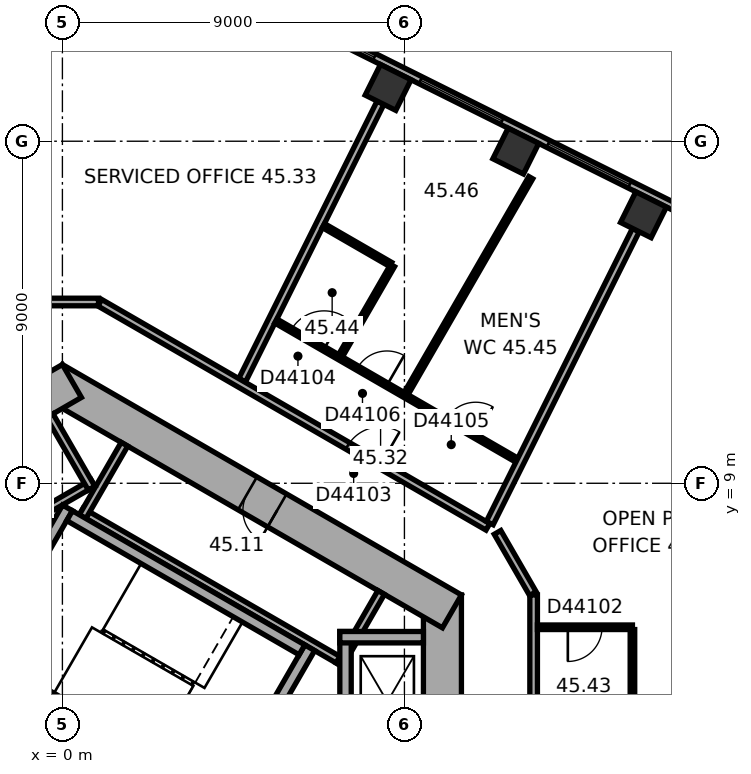
"""IFC4 building model, lengths in metres.
Left out: names, types, materials, properties, quantities, classifications, styles, units other than length and angle.
Written with IfcOpenShell. Run it as: python <this file> out.ifc"""

import sys

from ifc_helpers import new_model, si_unit, direction, frame, frame_2d, origin, origin_2d, place, context, subcontext, project, spatial, rectangle, extrude, element, fill, save


model = new_model("IFC4")
c1 = context("Model", 3, precision=1e-05, world=origin(), true_north=direction((0.0, 1.0)))
c2 = subcontext(c1, "Body", "Model", "MODEL_VIEW")
j1 = project(units=[si_unit("LENGTHUNIT", "METRE"), si_unit("PLANEANGLEUNIT", "RADIAN")], contexts=[c1])
p1 = place(None, origin())
s1 = spatial("IfcSite", under=j1, at=p1, CompositionType="ELEMENT")
p2 = place(p1, origin())
s2 = spatial("IfcBuilding", under=s1, at=p2, CompositionType="ELEMENT")
p3 = place(p2, frame((0.0, 0.0, 183.6)))
s3 = spatial("IfcBuildingStorey", under=s2, at=p3, CompositionType="ELEMENT", Elevation=183.6)
for number, where, z_axis, x_axis in (
    (1, (15.29, 16.065, 0.0), (0.0, 0.0, 1.0), (-0.895, 0.446, 0.0)),
    (2, (11.931, 17.74, 0.0), (0.0, 0.0, 1.0), (-0.895, 0.446, 0.0)),
    (3, (8.571, 19.416, 0.0), (0.0, 0.0, 1.0), (-0.895, 0.446, 0.0)),
):
    element("IfcColumn", number, at=place(p3, frame(where, z_axis=z_axis, x_axis=x_axis)), inside=s3, PredefinedType="COLUMN", context=c2, shape_type="SweptSolid", body=[
        extrude(rectangle(XDim=0.9, YDim=0.9, at=origin_2d()), origin(), (0.0, 0.0, 1.0), 3.7),
    ])
p4 = place(p3, frame((10.0, -6.062, 0.0), z_axis=(0.0, 0.0, 1.0), x_axis=(0.0, 1.0, 0.0)))
e4 = element("IfcWall", 4, at=p4, inside=s3, PredefinedType="SHEAR", context=c2, shape_type="SweptSolid", body=[
    extrude(rectangle(XDim=12.125, YDim=1.0, at=frame_2d((6.062, 0.0))), origin(), (0.0, 0.0, 1.0), 3.7),
])
p5 = place(p4, frame((6.262, 0.0, 0.0)))
e5 = element("IfcOpeningElement", 5, at=p5, cuts=e4, PredefinedType="OPENING", context=c2, shape_type="SweptSolid", body=[
    extrude(rectangle(XDim=1.5, YDim=2.1, at=frame_2d((0.75, 1.05))), frame((0.0, 0.51, 0.0), z_axis=(0.0, -1.0, 0.0), x_axis=(1.0, 0.0, 0.0)), (0.0, 0.0, 1.0), 1.02),
])
p6 = place(p4, frame((3.112, 0.0, 0.0)))
e6 = element("IfcOpeningElement", 6, at=p6, cuts=e4, PredefinedType="OPENING", context=c2, shape_type="SweptSolid", body=[
    extrude(rectangle(XDim=0.9, YDim=2.1, at=frame_2d((0.45, 1.05))), frame((0.0, 0.51, 0.0), z_axis=(0.0, -1.0, 0.0), x_axis=(1.0, 0.0, 0.0)), (0.0, 0.0, 1.0), 1.02),
])
p7 = place(p3, frame((10.25, 5.629, 0.0), z_axis=(0.0, 0.0, 1.0), x_axis=(-0.866022616891, 0.50000482701, 0.0)))
e7 = element("IfcWall", 7, at=p7, inside=s3, PredefinedType="SHEAR", context=c2, shape_type="SweptSolid", body=[
    extrude(rectangle(XDim=12.125, YDim=1.0, at=frame_2d((6.062, 0.0))), origin(), (0.0, 0.0, 1.0), 3.7),
])
p8 = place(p7, frame((5.312, 0.0, 0.0)))
e8 = element("IfcOpeningElement", 8, at=p8, cuts=e7, PredefinedType="OPENING", context=c2, shape_type="SweptSolid", body=[
    extrude(rectangle(XDim=0.9, YDim=2.1, at=frame_2d((0.45, 1.05))), frame((0.0, 0.51, 0.0), z_axis=(0.0, -1.0, 0.0), x_axis=(1.0, 0.0, 0.0)), (0.0, 0.0, 1.0), 1.02),
])
p9 = place(p3, frame((0.25, 11.691, 0.0), z_axis=(0.0, 0.0, 1.0), x_axis=(-0.866022616891, -0.50000482701, 0.0)))
e9 = element("IfcWall", 9, at=p9, inside=s3, PredefinedType="SHEAR", context=c2, shape_type="SweptSolid", body=[
    extrude(rectangle(XDim=12.125, YDim=1.0, at=frame_2d((6.062, 0.0))), origin(), (0.0, 0.0, 1.0), 3.7),
])
p10 = place(p9, frame((6.262, 0.0, 0.0)))
e10 = element("IfcOpeningElement", 10, at=p10, cuts=e9, PredefinedType="OPENING", context=c2, shape_type="SweptSolid", body=[
    extrude(rectangle(XDim=1.5, YDim=2.1, at=frame_2d((0.75, 1.05))), frame((0.0, 0.51, 0.0), z_axis=(0.0, -1.0, 0.0), x_axis=(1.0, 0.0, 0.0)), (0.0, 0.0, 1.0), 1.02),
])
p11 = place(p9, frame((1.812, 0.0, 0.0)))
e11 = element("IfcOpeningElement", 11, at=p11, cuts=e9, PredefinedType="OPENING", context=c2, shape_type="SweptSolid", body=[
    extrude(rectangle(XDim=0.9, YDim=2.1, at=frame_2d((0.45, 1.05))), frame((0.0, 0.51, 0.0), z_axis=(0.0, -1.0, 0.0), x_axis=(1.0, 0.0, 0.0)), (0.0, 0.0, 1.0), 1.02),
])
p12 = place(p9, frame((4.412, 0.0, 0.0)))
e12 = element("IfcOpeningElement", 12, at=p12, cuts=e9, PredefinedType="OPENING", context=c2, shape_type="SweptSolid", body=[
    extrude(rectangle(XDim=0.9, YDim=2.1, at=frame_2d((0.45, 1.05))), frame((0.0, 0.51, 0.0), z_axis=(0.0, -1.0, 0.0), x_axis=(1.0, 0.0, 0.0)), (0.0, 0.0, 1.0), 1.02),
])
p13 = place(p3, frame((19.464, 14.599, 0.0), z_axis=(0.0, 0.0, 1.0), x_axis=(-0.894935755043, 0.446195018289, 0.0)))
e13 = element("IfcWall", 13, at=p13, inside=s3, PredefinedType="STANDARD", context=c2, shape_type="SweptSolid", body=[
    extrude(rectangle(XDim=20.044, YDim=0.2, at=frame_2d((10.022, 0.0))), origin(), (0.0, 0.0, 1.0), 3.7),
])
p14 = place(p13, frame((1.313, 0.0, 0.9)))
e14 = element("IfcOpeningElement", 14, at=p14, cuts=e13, PredefinedType="OPENING", context=c2, shape_type="SweptSolid", body=[
    extrude(rectangle(XDim=2.4, YDim=2.0, at=frame_2d((1.2, 1.0))), frame((0.0, 0.11, 0.0), z_axis=(0.0, -1.0, 0.0), x_axis=(1.0, 0.0, 0.0)), (0.0, 0.0, 1.0), 0.22),
])
p15 = place(p13, frame((5.067, 0.0, 0.9)))
e15 = element("IfcOpeningElement", 15, at=p15, cuts=e13, PredefinedType="OPENING", context=c2, shape_type="SweptSolid", body=[
    extrude(rectangle(XDim=2.4, YDim=2.0, at=frame_2d((1.2, 1.0))), frame((0.0, 0.11, 0.0), z_axis=(0.0, -1.0, 0.0), x_axis=(1.0, 0.0, 0.0)), (0.0, 0.0, 1.0), 0.22),
])
p16 = place(p13, frame((8.821, 0.0, 0.9)))
e16 = element("IfcOpeningElement", 16, at=p16, cuts=e13, PredefinedType="OPENING", context=c2, shape_type="SweptSolid", body=[
    extrude(rectangle(XDim=2.4, YDim=2.0, at=frame_2d((1.2, 1.0))), frame((0.0, 0.11, 0.0), z_axis=(0.0, -1.0, 0.0), x_axis=(1.0, 0.0, 0.0)), (0.0, 0.0, 1.0), 0.22),
])
p17 = place(p13, frame((12.575, 0.0, 0.9)))
e17 = element("IfcOpeningElement", 17, at=p17, cuts=e13, PredefinedType="OPENING", context=c2, shape_type="SweptSolid", body=[
    extrude(rectangle(XDim=2.4, YDim=2.0, at=frame_2d((1.2, 1.0))), frame((0.0, 0.11, 0.0), z_axis=(0.0, -1.0, 0.0), x_axis=(1.0, 0.0, 0.0)), (0.0, 0.0, 1.0), 0.22),
])
p18 = place(p13, frame((16.329, 0.0, 0.9)))
e18 = element("IfcOpeningElement", 18, at=p18, cuts=e13, PredefinedType="OPENING", context=c2, shape_type="SweptSolid", body=[
    extrude(rectangle(XDim=2.4, YDim=2.0, at=frame_2d((1.2, 1.0))), frame((0.0, 0.11, 0.0), z_axis=(0.0, -1.0, 0.0), x_axis=(1.0, 0.0, 0.0)), (0.0, 0.0, 1.0), 0.22),
])
p19 = place(p3, frame((7.424, 4.259, 0.0), z_axis=(0.0, 0.0, 1.0), x_axis=(-0.866026010844, 0.49999894854, 0.0)))
e19 = element("IfcWall", 19, at=p19, inside=s3, PredefinedType="PARTITIONING", context=c2, shape_type="SweptSolid", body=[
    extrude(rectangle(XDim=8.0, YDim=0.2, at=frame_2d((4.0, 0.0))), origin(), (0.0, 0.0, 1.0), 3.42),
])
for number, where, z_axis, x_axis in (
    (20, (7.287, 4.222, 0.0), (0.0, 0.0, 1.0), (0.5, 0.866, 0.0)),
    (21, (0.532, 8.122, 0.0), (0.0, 0.0, 1.0), (0.5, 0.866, 0.0)),
):
    element("IfcWall", number, at=place(p3, frame(where, z_axis=z_axis, x_axis=x_axis)), inside=s3, PredefinedType="PARTITIONING", context=c2, shape_type="SweptSolid", body=[
        extrude(rectangle(XDim=2.2, YDim=0.2, at=frame_2d((1.1, 0.0))), origin(), (0.0, 0.0, 1.0), 3.42),
    ])
p20 = place(p3, frame((0.803, 9.009, 0.0), z_axis=(0.0, 0.0, 1.0), x_axis=(-0.866028230842, -0.499995103361, 0.0)))
e22 = element("IfcWall", 22, at=p20, inside=s3, PredefinedType="PARTITIONING", context=c2, shape_type="SweptSolid", body=[
    extrude(rectangle(XDim=5.4, YDim=0.2, at=frame_2d((2.7, 0.0))), origin(), (0.0, 0.0, 1.0), 3.42),
])
p21 = place(p3, frame((0.767, 8.872, 0.0), z_axis=(0.0, 0.0, 1.0), x_axis=(-0.499994660107, 0.866028486751, 0.0)))
e23 = element("IfcWall", 23, at=p21, inside=s3, PredefinedType="PARTITIONING", context=c2, shape_type="SweptSolid", body=[
    extrude(rectangle(XDim=2.2, YDim=0.2, at=frame_2d((1.1, 0.0))), origin(), (0.0, 0.0, 1.0), 3.42),
])
p22 = place(p3, frame((4.158, 0.602, 0.0), z_axis=(0.0, 0.0, 1.0), x_axis=(0.499977259774, 0.866038532462, 0.0)))
e24 = element("IfcWall", 24, at=p22, inside=s3, PredefinedType="SHEAR", context=c2, shape_type="SweptSolid", body=[
    extrude(rectangle(XDim=4.7, YDim=0.3, at=frame_2d((2.35, 0.0))), origin(), (0.0, 0.0, 1.0), 3.42),
])
p23 = place(p22, frame((0.8, 0.0, 0.0)))
e25 = element("IfcOpeningElement", 25, at=p23, cuts=e24, PredefinedType="OPENING", context=c2, shape_type="SweptSolid", body=[
    extrude(rectangle(XDim=1.2, YDim=2.1, at=frame_2d((0.6, 1.05))), frame((0.0, 0.16, 0.0), z_axis=(0.0, -1.0, 0.0), x_axis=(1.0, 0.0, 0.0)), (0.0, 0.0, 1.0), 0.32),
])
p24 = place(p3, frame((-2.216, 4.282, 0.0), z_axis=(0.0, 0.0, 1.0), x_axis=(0.499977259774, 0.866038532462, 0.0)))
e26 = element("IfcWall", 26, at=p24, inside=s3, PredefinedType="SHEAR", context=c2, shape_type="SweptSolid", body=[
    extrude(rectangle(XDim=4.7, YDim=0.3, at=frame_2d((2.35, 0.0))), origin(), (0.0, 0.0, 1.0), 3.42),
])
for number, where, z_axis, x_axis in (
    (27, (4.103, 0.807, 0.0), (0.0, 0.0, 1.0), (-0.866, 0.5, 0.0)),
    (28, (6.303, 4.617, 0.0), (0.0, 0.0, 1.0), (-0.866, 0.5, 0.0)),
):
    element("IfcWall", number, at=place(p3, frame(where, z_axis=z_axis, x_axis=x_axis)), inside=s3, PredefinedType="SHEAR", context=c2, shape_type="SweptSolid", body=[
        extrude(rectangle(XDim=7.06, YDim=0.3, at=frame_2d((3.53, 0.0))), origin(), (0.0, 0.0, 1.0), 3.42),
    ])
p25 = place(p3, frame((7.45, 1.75, 0.0), z_axis=(0.0, 0.0, 1.0), x_axis=(0.0, 1.0, 0.0)))
e29 = element("IfcWall", 29, at=p25, inside=s3, PredefinedType="SHEAR", context=c2, shape_type="SweptSolid", body=[
    extrude(rectangle(XDim=3.35, YDim=0.3, at=frame_2d((1.675, 0.0))), origin(), (0.0, 0.0, 1.0), 3.42),
])
p26 = place(p3, frame((7.3, 4.95, 0.0), z_axis=(0.0, 0.0, 1.0), x_axis=(1.0, 0.0, 0.0)))
e30 = element("IfcWall", 30, at=p26, inside=s3, PredefinedType="SHEAR", context=c2, shape_type="SweptSolid", body=[
    extrude(rectangle(XDim=2.2, YDim=0.3, at=frame_2d((1.1, 0.0))), origin(), (0.0, 0.0, 1.0), 3.42),
])
p27 = place(p3, frame((0.95, 13.77, 0.0), z_axis=(0.0, 0.0, 1.0), x_axis=(-1.0, 0.0, 0.0)))
e31 = element("IfcWall", 31, at=p27, inside=s3, PredefinedType="PARTITIONING", context=c2, shape_type="SweptSolid", body=[
    extrude(rectangle(XDim=1.9, YDim=0.2, at=frame_2d((0.95, 0.0))), origin(), (0.0, 0.0, 1.0), 3.42),
])
p28 = place(p3, frame((7.318, 12.356, 0.0), z_axis=(0.0, 0.0, 1.0), x_axis=(0.499982138324, 0.866035715982, 0.0)))
e32 = element("IfcWall", 32, at=p28, inside=s3, PredefinedType="PARTITIONING", context=c2, shape_type="SweptSolid", body=[
    extrude(rectangle(XDim=2.74, YDim=0.12, at=frame_2d((1.37, 0.0))), origin(), (0.0, 0.0, 1.0), 3.42),
])
p29 = place(p3, frame((8.37, 19.013, 0.0), z_axis=(0.0, 0.0, 1.0), x_axis=(-0.446183598632, -0.894941448538, 0.0)))
e33 = element("IfcWall", 33, at=p29, inside=s3, PredefinedType="PARTITIONING", context=c2, shape_type="SweptSolid", body=[
    extrude(rectangle(XDim=8.156, YDim=0.2, at=frame_2d((4.078, 0.0))), origin(), (0.0, 0.0, 1.0), 3.42),
])
p30 = place(p3, frame((8.636, 14.759, 0.0), z_axis=(0.0, 0.0, 1.0), x_axis=(-0.866010195725, 0.500026340207, 0.0)))
e34 = element("IfcWall", 34, at=p30, inside=s3, PredefinedType="PARTITIONING", context=c2, shape_type="SweptSolid", body=[
    extrude(rectangle(XDim=2.04, YDim=0.12, at=frame_2d((1.02, 0.0))), origin(), (0.0, 0.0, 1.0), 3.42),
])
p31 = place(p3, frame((11.196, 7.854, 0.0), z_axis=(0.0, 0.0, 1.0), x_axis=(-0.866023877043, 0.500002644385, 0.0)))
e35 = element("IfcWall", 35, at=p31, inside=s3, PredefinedType="PARTITIONING", context=c2, shape_type="SweptSolid", body=[
    extrude(rectangle(XDim=11.792, YDim=0.2, at=frame_2d((5.896, 0.0))), origin(), (0.0, 0.0, 1.0), 3.42),
])
p32 = place(p31, frame((3.261, 0.0, 0.0)))
e36 = element("IfcOpeningElement", 36, at=p32, cuts=e35, PredefinedType="OPENING", context=c2, shape_type="SweptSolid", body=[
    extrude(rectangle(XDim=1.0, YDim=2.1, at=frame_2d((0.5, 1.05))), frame((0.0, 0.11, 0.0), z_axis=(0.0, -1.0, 0.0), x_axis=(1.0, 0.0, 0.0)), (0.0, 0.0, 1.0), 0.22),
])
p33 = place(p3, frame((11.959, 9.608, 0.0), z_axis=(0.0, 0.0, 1.0), x_axis=(-0.866018452427, 0.500012039911, 0.0)))
e37 = element("IfcWall", 37, at=p33, inside=s3, PredefinedType="PARTITIONING", context=c2, shape_type="SweptSolid", body=[
    extrude(rectangle(XDim=7.322, YDim=0.12, at=frame_2d((3.661, 0.0))), origin(), (0.0, 0.0, 1.0), 3.42),
])
p34 = place(p33, frame((5.858, 0.0, 0.0)))
e38 = element("IfcOpeningElement", 38, at=p34, cuts=e37, PredefinedType="OPENING", context=c2, shape_type="SweptSolid", body=[
    extrude(rectangle(XDim=1.0, YDim=2.1, at=frame_2d((0.5, 1.05))), frame((0.0, 0.07, 0.0), z_axis=(0.0, -1.0, 0.0), x_axis=(1.0, 0.0, 0.0)), (0.0, 0.0, 1.0), 0.14),
])
p35 = place(p33, frame((1.25, 0.0, 0.0)))
e39 = element("IfcOpeningElement", 39, at=p35, cuts=e37, PredefinedType="OPENING", context=c2, shape_type="SweptSolid", body=[
    extrude(rectangle(XDim=0.9, YDim=2.1, at=frame_2d((0.45, 1.05))), frame((0.0, 0.07, 0.0), z_axis=(0.0, -1.0, 0.0), x_axis=(1.0, 0.0, 0.0)), (0.0, 0.0, 1.0), 0.14),
])
p36 = place(p33, frame((3.947, 0.0, 0.0)))
e40 = element("IfcOpeningElement", 40, at=p36, cuts=e37, PredefinedType="OPENING", context=c2, shape_type="SweptSolid", body=[
    extrude(rectangle(XDim=0.9, YDim=2.1, at=frame_2d((0.45, 1.05))), frame((0.0, 0.07, 0.0), z_axis=(0.0, -1.0, 0.0), x_axis=(1.0, 0.0, 0.0)), (0.0, 0.0, 1.0), 0.14),
])
p37 = place(p3, frame((12.325, 17.041, 0.0), z_axis=(0.0, 0.0, 1.0), x_axis=(-0.499985538654, -0.866033752885, 0.0)))
e41 = element("IfcWall", 41, at=p37, inside=s3, PredefinedType="PARTITIONING", context=c2, shape_type="SweptSolid", body=[
    extrude(rectangle(XDim=6.56, YDim=0.12, at=frame_2d((3.28, 0.0))), origin(), (0.0, 0.0, 1.0), 3.42),
])
p38 = place(p3, frame((12.38, 6.097, 0.0), z_axis=(0.0, 0.0, 1.0), x_axis=(-0.499964847546, 0.866045698112, 0.0)))
e42 = element("IfcWall", 42, at=p38, inside=s3, PredefinedType="PARTITIONING", context=c2, shape_type="SweptSolid", body=[
    extrude(rectangle(XDim=1.86, YDim=0.2, at=frame_2d((0.93, 0.0))), origin(), (0.0, 0.0, 1.0), 3.42),
])
p39 = place(p3, frame((12.4, 3.011, 0.0), z_axis=(0.0, 0.0, 1.0), x_axis=(0.0, 1.0, 0.0)))
e43 = element("IfcWall", 43, at=p39, inside=s3, PredefinedType="PARTITIONING", context=c2, shape_type="SweptSolid", body=[
    extrude(rectangle(XDim=3.051, YDim=0.2, at=frame_2d((1.525, 0.0))), origin(), (0.0, 0.0, 1.0), 3.42),
])
p40 = place(p3, frame((12.5, 5.211, 0.0), z_axis=(0.0, 0.0, 1.0), x_axis=(1.0, 0.0, 0.0)))
e44 = element("IfcWall", 44, at=p40, inside=s3, PredefinedType="PARTITIONING", context=c2, shape_type="SweptSolid", body=[
    extrude(rectangle(XDim=2.5, YDim=0.12, at=frame_2d((1.25, 0.0))), origin(), (0.0, 0.0, 1.0), 3.42),
])
p41 = place(p40, frame((0.8, 0.0, 0.0)))
e45 = element("IfcOpeningElement", 45, at=p41, cuts=e44, PredefinedType="OPENING", context=c2, shape_type="SweptSolid", body=[
    extrude(rectangle(XDim=0.9, YDim=2.1, at=frame_2d((0.45, 1.05))), frame((0.0, 0.07, 0.0), z_axis=(0.0, -1.0, 0.0), x_axis=(1.0, 0.0, 0.0)), (0.0, 0.0, 1.0), 0.14),
])
p42 = place(p3, frame((15.0, 5.151, 0.0), z_axis=(0.0, 0.0, 1.0), x_axis=(0.0, -1.0, 0.0)))
e46 = element("IfcWall", 46, at=p42, inside=s3, PredefinedType="PARTITIONING", context=c2, shape_type="SweptSolid", body=[
    extrude(rectangle(XDim=2.08, YDim=0.12, at=frame_2d((1.04, 0.0))), origin(), (0.0, 0.0, 1.0), 3.42),
])
p43 = place(p3, frame((15.09, 15.663, 0.0), z_axis=(0.0, 0.0, 1.0), x_axis=(-0.446204491029, -0.894931032083, 0.0)))
e47 = element("IfcWall", 47, at=p43, inside=s3, PredefinedType="PARTITIONING", context=c2, shape_type="SweptSolid", body=[
    extrude(rectangle(XDim=8.615, YDim=0.2, at=frame_2d((4.308, 0.0))), origin(), (0.0, 0.0, 1.0), 3.42),
])
p44 = place(p15, origin())
e48 = element("IfcWindow", 48, at=p44, inside=s3, PartitioningType="SINGLE_PANEL", PredefinedType="WINDOW", context=c2, shape_type="SweptSolid", body=[
    extrude(rectangle(XDim=2.4, YDim=2.0, at=frame_2d((1.2, 1.0))), frame((0.0, 0.03, 0.0), z_axis=(0.0, -1.0, 0.0), x_axis=(1.0, 0.0, 0.0)), (0.0, 0.0, 1.0), 0.06),
])
fill(e15, e48)
p45 = place(p16, origin())
e49 = element("IfcWindow", 49, at=p45, inside=s3, PartitioningType="SINGLE_PANEL", PredefinedType="WINDOW", context=c2, shape_type="SweptSolid", body=[
    extrude(rectangle(XDim=2.4, YDim=2.0, at=frame_2d((1.2, 1.0))), frame((0.0, 0.03, 0.0), z_axis=(0.0, -1.0, 0.0), x_axis=(1.0, 0.0, 0.0)), (0.0, 0.0, 1.0), 0.06),
])
fill(e16, e49)
p46 = place(p17, origin())
e50 = element("IfcWindow", 50, at=p46, inside=s3, PartitioningType="SINGLE_PANEL", PredefinedType="WINDOW", context=c2, shape_type="SweptSolid", body=[
    extrude(rectangle(XDim=2.4, YDim=2.0, at=frame_2d((1.2, 1.0))), frame((0.0, 0.03, 0.0), z_axis=(0.0, -1.0, 0.0), x_axis=(1.0, 0.0, 0.0)), (0.0, 0.0, 1.0), 0.06),
])
fill(e17, e50)
p47 = place(p8, origin())
e51 = element("IfcDoor", 51, at=p47, inside=s3, OperationType="SINGLE_SWING_LEFT", PredefinedType="DOOR", context=c2, shape_type="SweptSolid", body=[
    extrude(rectangle(XDim=0.9, YDim=2.1, at=frame_2d((0.45, 1.05))), frame((0.0, 0.025, 0.0), z_axis=(0.0, -1.0, 0.0), x_axis=(1.0, 0.0, 0.0)), (0.0, 0.0, 1.0), 0.05),
])
fill(e8, e51)
p48 = place(p41, origin())
e52 = element("IfcDoor", 52, at=p48, inside=s3, OperationType="SINGLE_SWING_LEFT", PredefinedType="DOOR", context=c2, shape_type="SweptSolid", body=[
    extrude(rectangle(XDim=0.9, YDim=2.1, at=frame_2d((0.45, 1.05))), frame((0.0, 0.025, 0.0), z_axis=(0.0, -1.0, 0.0), x_axis=(1.0, 0.0, 0.0)), (0.0, 0.0, 1.0), 0.05),
])
fill(e45, e52)
p49 = place(p32, origin())
e53 = element("IfcDoor", 53, at=p49, inside=s3, OperationType="SINGLE_SWING_LEFT", PredefinedType="DOOR", context=c2, shape_type="SweptSolid", body=[
    extrude(rectangle(XDim=1.0, YDim=2.1, at=frame_2d((0.5, 1.05))), frame((0.0, 0.025, 0.0), z_axis=(0.0, -1.0, 0.0), x_axis=(1.0, 0.0, 0.0)), (0.0, 0.0, 1.0), 0.05),
])
fill(e36, e53)
p50 = place(p34, origin())
e54 = element("IfcDoor", 54, at=p50, inside=s3, OperationType="SINGLE_SWING_LEFT", PredefinedType="DOOR", context=c2, shape_type="SweptSolid", body=[
    extrude(rectangle(XDim=1.0, YDim=2.1, at=frame_2d((0.5, 1.05))), frame((0.0, 0.025, 0.0), z_axis=(0.0, -1.0, 0.0), x_axis=(1.0, 0.0, 0.0)), (0.0, 0.0, 1.0), 0.05),
])
fill(e38, e54)
p51 = place(p35, origin())
e55 = element("IfcDoor", 55, at=p51, inside=s3, OperationType="SINGLE_SWING_LEFT", PredefinedType="DOOR", context=c2, shape_type="SweptSolid", body=[
    extrude(rectangle(XDim=0.9, YDim=2.1, at=frame_2d((0.45, 1.05))), frame((0.0, 0.025, 0.0), z_axis=(0.0, -1.0, 0.0), x_axis=(1.0, 0.0, 0.0)), (0.0, 0.0, 1.0), 0.05),
])
fill(e39, e55)
p52 = place(p36, origin())
e56 = element("IfcDoor", 56, at=p52, inside=s3, OperationType="SINGLE_SWING_LEFT", PredefinedType="DOOR", context=c2, shape_type="SweptSolid", body=[
    extrude(rectangle(XDim=0.9, YDim=2.1, at=frame_2d((0.45, 1.05))), frame((0.0, 0.025, 0.0), z_axis=(0.0, -1.0, 0.0), x_axis=(1.0, 0.0, 0.0)), (0.0, 0.0, 1.0), 0.05),
])
fill(e40, e56)
save(model, sys.argv[1])
